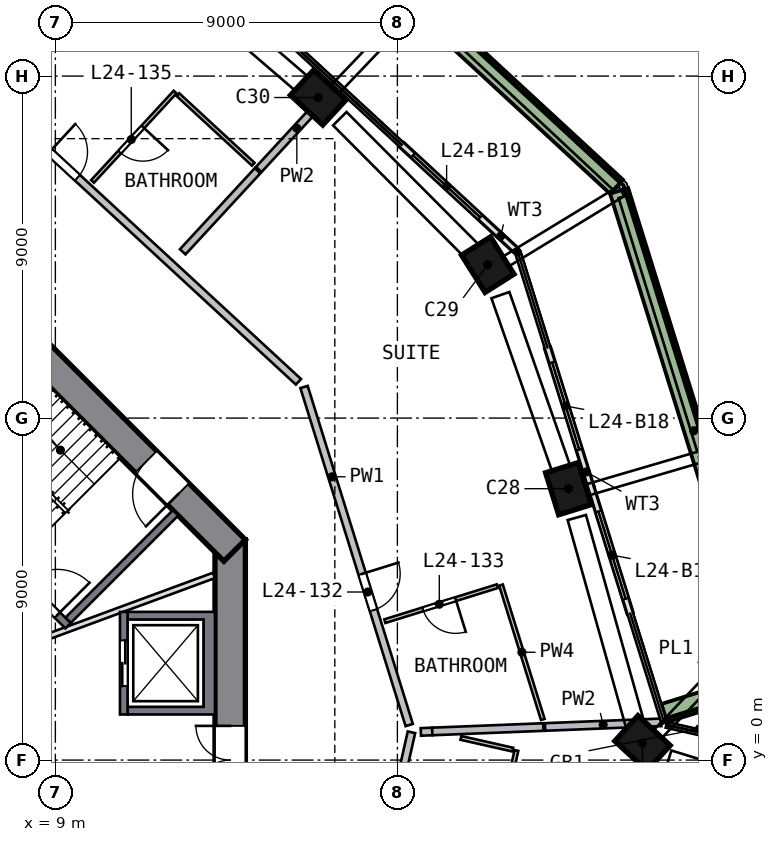
"""IFC4 building model, lengths in metres.
Left out: names, types, materials, properties, quantities, classifications, styles, units other than length and angle.
Written with IfcOpenShell. Run it as: python <this file> out.ifc"""

import sys

from ifc_helpers import new_model, si_unit, direction, frame, frame_2d, origin, origin_2d, place, context, subcontext, project, spatial, polyline, rectangle, outline, extrude, element, fill, save


model = new_model("IFC4")
c1 = context("Model", 3, precision=1e-05, world=origin(), true_north=direction((0.0, 1.0)))
c2 = subcontext(c1, "Body", "Model", "MODEL_VIEW")
j1 = project(units=[si_unit("LENGTHUNIT", "METRE"), si_unit("PLANEANGLEUNIT", "RADIAN")], contexts=[c1])
p1 = place(None, origin())
s1 = spatial("IfcSite", under=j1, at=p1, CompositionType="ELEMENT")
p2 = place(p1, origin())
s2 = spatial("IfcBuilding", under=s1, at=p2, CompositionType="ELEMENT")
p3 = place(p2, frame((0.0, 0.0, 103.5)))
s3 = spatial("IfcBuildingStorey", under=s2, at=p3, CompositionType="ELEMENT", Elevation=103.5)
p4 = place(p3, frame((24.452, 0.303, 0.0), z_axis=(-0.002432499, 0.116227826, 0.993219601), x_axis=(0.736974698, -0.671128585, 0.080341252)))
e1 = element("IfcColumn", 1, at=p4, inside=s3, PredefinedType="COLUMN", context=c2, shape_type="SweptSolid", body=[
    extrude(rectangle(XDim=1.15, YDim=0.9, at=origin_2d()), origin(), (0.0, 0.0, 1.0), 3.212),
])
p5 = place(p3, frame((22.543, 7.013, 0.0), z_axis=(-0.034222789, 0.106927204, 0.993677701), x_axis=(-0.29485661, 0.948923521, -0.112266336)))
e2 = element("IfcColumn", 2, at=p5, inside=s3, PredefinedType="COLUMN", context=c2, shape_type="SweptSolid", body=[
    extrude(rectangle(XDim=1.15, YDim=0.9, at=origin_2d()), origin(), (0.0, 0.0, 1.0), 3.21),
])
p6 = place(p3, frame((20.454, 12.92, 0.0), z_axis=(-0.062265779, 0.096705826, 0.993363456), x_axis=(0.530656246, -0.839747489, 0.115013491)))
e3 = element("IfcColumn", 3, at=p6, inside=s3, PredefinedType="COLUMN", context=c2, shape_type="SweptSolid", body=[
    extrude(rectangle(XDim=1.15, YDim=0.9, at=origin_2d()), origin(), (0.0, 0.0, 1.0), 3.211),
])
p7 = place(p3, frame((16.016, 17.344, 0.0), z_axis=(-0.083123025, 0.075517991, 0.993673787), x_axis=(-0.729776299, 0.674399767, -0.112300969)))
e4 = element("IfcColumn", 4, at=p7, inside=s3, PredefinedType="COLUMN", context=c2, shape_type="SweptSolid", body=[
    extrude(rectangle(XDim=1.15, YDim=0.9, at=origin_2d()), origin(), (0.0, 0.0, 1.0), 3.21),
])
p8 = place(p3, frame((13.6, -5.799, 0.0), z_axis=(0.0, 0.0, 1.0), x_axis=(0.0, 1.0, 0.0)))
e5 = element("IfcWall", 5, at=p8, inside=s3, PredefinedType="SHEAR", context=c2, shape_type="SweptSolid", body=[
    extrude(rectangle(XDim=11.598, YDim=0.8, at=frame_2d((5.799, 0.0))), origin(), (0.0, 0.0, 1.0), 3.5),
])
p9 = place(p8, frame((4.899, 0.0, 0.0)))
e6 = element("IfcOpeningElement", 6, at=p9, cuts=e5, PredefinedType="OPENING", context=c2, shape_type="SweptSolid", body=[
    extrude(rectangle(XDim=1.8, YDim=2.1, at=frame_2d((0.9, 1.05))), frame((0.0, 0.41, 0.0), z_axis=(0.0, -1.0, 0.0), x_axis=(1.0, 0.0, 0.0)), (0.0, 0.0, 1.0), 0.82),
])
p10 = place(p3, frame((13.717, 5.516, 0.0), z_axis=(0.0, 0.0, 1.0), x_axis=(-0.707106781, 0.707106781, 0.0)))
e7 = element("IfcWall", 7, at=p10, inside=s3, PredefinedType="SHEAR", context=c2, shape_type="SweptSolid", body=[
    extrude(rectangle(XDim=11.598, YDim=0.8, at=frame_2d((5.799, 0.0))), origin(), (0.0, 0.0, 1.0), 3.5),
])
p11 = place(p10, frame((2.099, 0.0, 0.0)))
e8 = element("IfcOpeningElement", 8, at=p11, cuts=e7, PredefinedType="OPENING", context=c2, shape_type="SweptSolid", body=[
    extrude(rectangle(XDim=1.2, YDim=2.1, at=frame_2d((0.6, 1.05))), frame((0.0, 0.41, 0.0), z_axis=(0.0, -1.0, 0.0), x_axis=(1.0, 0.0, 0.0)), (0.0, 0.0, 1.0), 0.82),
])
p12 = place(p3, frame((24.124, 3.865, 0.0), z_axis=(0.0, 0.0, 1.0), x_axis=(-0.297046624, 0.954862976, 0.0)))
e9 = element("IfcWall", 9, at=p12, inside=s3, PredefinedType="SOLIDWALL", context=c2, shape_type="SweptSolid", body=[
    extrude(rectangle(XDim=3.475, YDim=0.15, at=frame_2d((1.737, 0.0))), origin(), (0.0, 0.0, 1.0), 2.425),
])
p13 = place(p12, frame((0.4, 0.0, 0.0)))
e10 = element("IfcOpeningElement", 10, at=p13, cuts=e9, PredefinedType="OPENING", context=c2, shape_type="SweptSolid", body=[
    extrude(rectangle(XDim=2.4, YDim=2.4, at=frame_2d((1.2, 1.2))), frame((0.0, 0.085, 0.0), z_axis=(0.0, -1.0, 0.0), x_axis=(1.0, 0.0, 0.0)), (0.0, 0.0, 1.0), 0.17),
])
p14 = place(p3, frame((23.092, 7.183, 0.0), z_axis=(0.0, 0.0, 1.0), x_axis=(-0.297049788, 0.954861992, 0.0)))
e11 = element("IfcWall", 11, at=p14, inside=s3, PredefinedType="SOLIDWALL", context=c2, shape_type="SweptSolid", body=[
    extrude(rectangle(XDim=3.836, YDim=0.15, at=frame_2d((1.918, 0.0))), origin(), (0.0, 0.0, 1.0), 2.425),
])
p15 = place(p14, frame((1.035, 0.0, 0.0)))
e12 = element("IfcOpeningElement", 12, at=p15, cuts=e11, PredefinedType="OPENING", context=c2, shape_type="SweptSolid", body=[
    extrude(rectangle(XDim=2.4, YDim=2.4, at=frame_2d((1.2, 1.2))), frame((0.0, 0.085, 0.0), z_axis=(0.0, -1.0, 0.0), x_axis=(1.0, 0.0, 0.0)), (0.0, 0.0, 1.0), 0.17),
])
p16 = place(p3, frame((21.108, 13.425, 0.0), z_axis=(0.0, 0.0, 1.0), x_axis=(-0.734695286, 0.678397256, 0.0)))
e13 = element("IfcWall", 13, at=p16, inside=s3, PredefinedType="SOLIDWALL", context=c2, shape_type="SweptSolid", body=[
    extrude(rectangle(XDim=4.068, YDim=0.15, at=frame_2d((2.034, 0.0))), origin(), (0.0, 0.0, 1.0), 2.425),
])
p17 = place(p16, frame((1.268, 0.0, 0.0)))
e14 = element("IfcOpeningElement", 14, at=p17, cuts=e13, PredefinedType="OPENING", context=c2, shape_type="SweptSolid", body=[
    extrude(rectangle(XDim=2.4, YDim=2.4, at=frame_2d((1.2, 1.2))), frame((0.0, 0.085, 0.0), z_axis=(0.0, -1.0, 0.0), x_axis=(1.0, 0.0, 0.0)), (0.0, 0.0, 1.0), 0.17),
])
p18 = place(p3, frame((25.021, 1.238, 0.0), z_axis=(0.0, 0.0, 1.0), x_axis=(0.954841862, 0.297114489, 0.0)))
e15 = element("IfcWall", 15, at=p18, inside=s3, PredefinedType="SOLIDWALL", context=c2, shape_type="SweptSolid", body=[
    extrude(rectangle(XDim=3.199, YDim=0.5, at=frame_2d((1.6, 0.0))), origin(), (0.0, 0.0, 1.0), 0.7),
])
p19 = place(p3, frame((27.762, 2.353, 0.0), z_axis=(0.0, 0.0, 1.0), x_axis=(-0.297026901, 0.954869112, 0.0)))
e16 = element("IfcWall", 16, at=p19, inside=s3, PredefinedType="SOLIDWALL", context=c2, shape_type="SweptSolid", body=[
    extrude(rectangle(XDim=13.223, YDim=0.5, at=frame_2d((6.612, 0.0))), origin(), (0.0, 0.0, 1.0), 0.7),
])
p20 = place(p3, frame((23.765, 15.089, 0.0), z_axis=(0.0, 0.0, 1.0), x_axis=(-0.734673161, 0.678421217, 0.0)))
e17 = element("IfcWall", 17, at=p20, inside=s3, PredefinedType="SOLIDWALL", context=c2, shape_type="SweptSolid", body=[
    extrude(rectangle(XDim=13.723, YDim=0.5, at=frame_2d((6.862, 0.0))), origin(), (0.0, 0.0, 1.0), 0.7),
])
p21 = place(p3, frame((26.858, 0.447, 0.0), z_axis=(0.0, 0.0, 1.0), x_axis=(-0.220190066, -0.975456988, 0.0)))
e18 = element("IfcWall", 18, at=p21, inside=s3, PredefinedType="SOLIDWALL", context=c2, shape_type="SweptSolid", body=[
    extrude(rectangle(XDim=12.7, YDim=0.2, at=frame_2d((6.35, 0.0))), origin(), (0.0, 0.0, 1.0), 3.19),
])
p22 = place(p21, frame((5.45, 0.0, 0.0)))
e19 = element("IfcOpeningElement", 19, at=p22, cuts=e18, PredefinedType="OPENING", context=c2, shape_type="SweptSolid", body=[
    extrude(rectangle(XDim=1.8, YDim=2.4, at=frame_2d((0.9, 1.2))), frame((0.0, 0.11, 0.0), z_axis=(0.0, -1.0, 0.0), x_axis=(1.0, 0.0, 0.0)), (0.0, 0.0, 1.0), 0.22),
])
p23 = place(p3, origin())
e20 = element("IfcWall", 20, at=p23, inside=s3, PredefinedType="SOLIDWALL", context=c2, shape_type="SweptSolid", body=[
    extrude(outline(polyline([(13.2, 3.9), (13.2, 1.2), (10.9, 1.2), (10.9, 1.4), (12.9, 1.4), (12.9, 3.7), (10.9, 3.7), (10.9, 3.9), (13.2, 3.9)])), origin(), (0.0, 0.0, 1.0), 3.19),
])
p24 = place(p3, frame((10.8, 1.2, 0.0), z_axis=(0.0, 0.0, 1.0), x_axis=(0.0, 1.0, 0.0)))
e21 = element("IfcWall", 21, at=p24, inside=s3, PredefinedType="SOLIDWALL", context=c2, shape_type="SweptSolid", body=[
    extrude(rectangle(XDim=2.7, YDim=0.2, at=frame_2d((1.35, 0.0))), origin(), (0.0, 0.0, 1.0), 3.19),
])
p25 = place(p24, frame((0.75, 0.0, 0.0)))
e22 = element("IfcOpeningElement", 22, at=p25, cuts=e21, PredefinedType="OPENING", context=c2, shape_type="SweptSolid", body=[
    extrude(rectangle(XDim=1.2, YDim=2.1, at=frame_2d((0.6, 1.05))), frame((0.0, 0.11, 0.0), z_axis=(0.0, -1.0, 0.0), x_axis=(1.0, 0.0, 0.0)), (0.0, 0.0, 1.0), 0.22),
])
p26 = place(p3, frame((3.535, 9.334, 0.0), z_axis=(0.0, 0.0, 1.0), x_axis=(0.707106781, -0.707106781, 0.0)))
e23 = element("IfcWall", 23, at=p26, inside=s3, PredefinedType="SOLIDWALL", context=c2, shape_type="SweptSolid", body=[
    extrude(rectangle(XDim=8.2, YDim=0.2, at=frame_2d((4.1, 0.0))), origin(), (0.0, 0.0, 1.0), 3.19),
])
p27 = place(p26, frame((6.6, 0.0, 0.0)))
e24 = element("IfcOpeningElement", 24, at=p27, cuts=e23, PredefinedType="OPENING", context=c2, shape_type="SweptSolid", body=[
    extrude(rectangle(XDim=1.2, YDim=2.1, at=frame_2d((0.6, 1.05))), frame((0.0, 0.11, 0.0), z_axis=(0.0, -1.0, 0.0), x_axis=(1.0, 0.0, 0.0)), (0.0, 0.0, 1.0), 0.22),
])
p28 = place(p3, frame((9.334, 3.677, 0.0), z_axis=(0.0, 0.0, 1.0), x_axis=(0.707106781, 0.707106781, 0.0)))
e25 = element("IfcWall", 25, at=p28, inside=s3, PredefinedType="SOLIDWALL", context=c2, shape_type="SweptSolid", body=[
    extrude(rectangle(XDim=4.0, YDim=0.2, at=frame_2d((2.0, 0.0))), origin(), (0.0, 0.0, 1.0), 3.19),
])
p29 = place(p3, frame((4.813, 1.776, 0.0), z_axis=(0.0, 0.0, 1.0), x_axis=(0.938191915, 0.346115488, 0.0)))
e26 = element("IfcWall", 26, at=p29, inside=s3, PredefinedType="PARTITIONING", context=c2, shape_type="SweptSolid", body=[
    extrude(rectangle(XDim=8.91, YDim=0.15, at=frame_2d((4.455, 0.0))), origin(), (0.0, 0.0, 1.0), 3.19),
])
p30 = place(p29, frame((1.4, 0.0, 0.0)))
e27 = element("IfcOpeningElement", 27, at=p30, cuts=e26, PredefinedType="OPENING", context=c2, shape_type="SweptSolid", body=[
    extrude(rectangle(XDim=1.8, YDim=2.1, at=frame_2d((0.9, 1.05))), frame((0.0, 0.085, 0.0), z_axis=(0.0, -1.0, 0.0), x_axis=(1.0, 0.0, 0.0)), (0.0, 0.0, 1.0), 0.17),
])
p31 = place(p3, frame((8.699, 16.139, 0.0), z_axis=(0.0, 0.0, 1.0), x_axis=(0.734682268, -0.678411354, 0.0)))
e28 = element("IfcWall", 28, at=p31, inside=s3, PredefinedType="SOLIDWALL", context=c2, shape_type="SweptSolid", body=[
    extrude(rectangle(XDim=9.115, YDim=0.2, at=frame_2d((4.558, 0.0))), origin(), (0.0, 0.0, 1.0), 3.19),
])
p32 = place(p31, frame((0.2, 0.0, 0.0)))
e29 = element("IfcOpeningElement", 29, at=p32, cuts=e28, PredefinedType="OPENING", context=c2, shape_type="SweptSolid", body=[
    extrude(rectangle(XDim=1.0, YDim=2.1, at=frame_2d((0.5, 1.05))), frame((0.0, 0.11, 0.0), z_axis=(0.0, -1.0, 0.0), x_axis=(1.0, 0.0, 0.0)), (0.0, 0.0, 1.0), 0.22),
])
p33 = place(p3, frame((15.543, 9.818, 0.0), z_axis=(0.0, 0.0, 1.0), x_axis=(0.297043721, -0.954863879, 0.0)))
e30 = element("IfcWall", 30, at=p33, inside=s3, PredefinedType="SOLIDWALL", context=c2, shape_type="SweptSolid", body=[
    extrude(rectangle(XDim=9.316, YDim=0.2, at=frame_2d((4.658, 0.0))), origin(), (0.0, 0.0, 1.0), 3.19),
])
p34 = place(p33, frame((5.15, 0.0, 0.0)))
e31 = element("IfcOpeningElement", 31, at=p34, cuts=e30, PredefinedType="OPENING", context=c2, shape_type="SweptSolid", body=[
    extrude(rectangle(XDim=1.0, YDim=2.1, at=frame_2d((0.5, 1.05))), frame((0.0, 0.11, 0.0), z_axis=(0.0, -1.0, 0.0), x_axis=(1.0, 0.0, 0.0)), (0.0, 0.0, 1.0), 0.22),
])
p35 = place(p3, frame((17.565, -2.837, 0.0), z_axis=(0.0, 0.0, 1.0), x_axis=(0.220158455, 0.975464123, 0.0)))
e32 = element("IfcWall", 32, at=p35, inside=s3, PredefinedType="SOLIDWALL", context=c2, shape_type="SweptSolid", body=[
    extrude(rectangle(XDim=3.658, YDim=0.2, at=frame_2d((1.829, 0.0))), origin(), (0.0, 0.0, 1.0), 3.19),
])
p36 = place(p3, frame((12.351, 13.375, 0.0), z_axis=(0.0, 0.0, 1.0), x_axis=(0.678388316, 0.73470354, 0.0)))
e33 = element("IfcWall", 33, at=p36, inside=s3, PredefinedType="SOLIDWALL", context=c2, shape_type="SweptSolid", body=[
    extrude(rectangle(XDim=2.905, YDim=0.2, at=frame_2d((1.452, 0.0))), origin(), (0.0, 0.0, 1.0), 3.19),
])
p37 = place(p3, frame((14.353, 15.543, 0.0), z_axis=(0.0, 0.0, 1.0), x_axis=(0.678427795, 0.734667086, 0.0)))
e34 = element("IfcWall", 34, at=p37, inside=s3, PredefinedType="SOLIDWALL", context=c2, shape_type="SweptSolid", body=[
    extrude(rectangle(XDim=2.952, YDim=0.2, at=frame_2d((1.476, 0.0))), origin(), (0.0, 0.0, 1.0), 3.19),
])
p38 = place(p3, frame((18.616, 0.741, 0.0), z_axis=(0.0, 0.0, 1.0), x_axis=(0.999211282, 0.039709126, 0.0)))
e35 = element("IfcWall", 35, at=p38, inside=s3, PredefinedType="SOLIDWALL", context=c2, shape_type="SweptSolid", body=[
    extrude(rectangle(XDim=0.301, YDim=0.2, at=frame_2d((0.151, 0.0))), origin(), (0.0, 0.0, 1.0), 3.19),
])
p39 = place(p3, frame((18.917, 0.753, 0.0), z_axis=(0.0, 0.0, 1.0), x_axis=(0.999210134, 0.039737992, 0.0)))
e36 = element("IfcWall", 36, at=p39, inside=s3, PredefinedType="SOLIDWALL", context=c2, shape_type="SweptSolid", body=[
    extrude(rectangle(XDim=2.924, YDim=0.2, at=frame_2d((1.462, 0.0))), origin(), (0.0, 0.0, 1.0), 3.19),
])
p40 = place(p3, frame((21.885, 0.871, 0.0), z_axis=(0.0, 0.0, 1.0), x_axis=(0.99920795, 0.039792878, 0.0)))
e37 = element("IfcWall", 37, at=p40, inside=s3, PredefinedType="SOLIDWALL", context=c2, shape_type="SweptSolid", body=[
    extrude(rectangle(XDim=3.062, YDim=0.2, at=frame_2d((1.531, 0.0))), origin(), (0.0, 0.0, 1.0), 3.19),
])
p41 = place(p3, frame((12.15, 17.58, 0.0), z_axis=(0.0, 0.0, 1.0), x_axis=(-0.678394168, -0.734698137, 0.0)))
e38 = element("IfcWall", 38, at=p41, inside=s3, PredefinedType="PARTITIONING", context=c2, shape_type="SweptSolid", body=[
    extrude(rectangle(XDim=3.2, YDim=0.1, at=frame_2d((1.6, 0.0))), origin(), (0.0, 0.0, 1.0), 3.19),
])
p42 = place(p41, frame((1.25, 0.0, 0.0)))
e39 = element("IfcOpeningElement", 39, at=p42, cuts=e38, PredefinedType="OPENING", context=c2, shape_type="SweptSolid", body=[
    extrude(rectangle(XDim=0.9, YDim=2.1, at=frame_2d((0.45, 1.05))), frame((0.0, 0.06, 0.0), z_axis=(0.0, -1.0, 0.0), x_axis=(1.0, 0.0, 0.0)), (0.0, 0.0, 1.0), 0.12),
])
p43 = place(p3, frame((12.224, 17.512, 0.0), z_axis=(0.0, 0.0, 1.0), x_axis=(0.734668232, -0.678426553, 0.0)))
e40 = element("IfcWall", 40, at=p43, inside=s3, PredefinedType="PARTITIONING", context=c2, shape_type="SweptSolid", body=[
    extrude(rectangle(XDim=2.7, YDim=0.1, at=frame_2d((1.35, 0.0))), origin(), (0.0, 0.0, 1.0), 3.19),
])
p44 = place(p3, frame((20.63, 4.576, 0.0), z_axis=(0.0, 0.0, 1.0), x_axis=(-0.954877129, -0.297001126, 0.0)))
e41 = element("IfcWall", 41, at=p44, inside=s3, PredefinedType="PARTITIONING", context=c2, shape_type="SweptSolid", body=[
    extrude(rectangle(XDim=3.1, YDim=0.1, at=frame_2d((1.55, 0.0))), origin(), (0.0, 0.0, 1.0), 3.19),
])
p45 = place(p44, frame((1.15, 0.0, 0.0)))
e42 = element("IfcOpeningElement", 42, at=p45, cuts=e41, PredefinedType="OPENING", context=c2, shape_type="SweptSolid", body=[
    extrude(rectangle(XDim=0.9, YDim=2.1, at=frame_2d((0.45, 1.05))), frame((0.0, 0.06, 0.0), z_axis=(0.0, -1.0, 0.0), x_axis=(1.0, 0.0, 0.0)), (0.0, 0.0, 1.0), 0.12),
])
p46 = place(p3, frame((19.671, 0.583, 0.0), z_axis=(0.0, 0.0, 1.0), x_axis=(0.975471239, -0.220126921, 0.0)))
e43 = element("IfcWall", 43, at=p46, inside=s3, PredefinedType="PARTITIONING", context=c2, shape_type="SweptSolid", body=[
    extrude(rectangle(XDim=1.399, YDim=0.1, at=frame_2d((0.699, 0.0))), origin(), (0.0, 0.0, 1.0), 3.19),
])
p47 = place(p3, frame((20.34, -3.259, 0.0), z_axis=(0.0, 0.0, 1.0), x_axis=(0.220196346, 0.97545557, 0.0)))
e44 = element("IfcWall", 44, at=p47, inside=s3, PredefinedType="PARTITIONING", context=c2, shape_type="SweptSolid", body=[
    extrude(rectangle(XDim=3.6, YDim=0.1, at=frame_2d((1.8, 0.0))), origin(), (0.0, 0.0, 1.0), 3.19),
])
p48 = place(p47, frame((1.2, 0.0, 0.0)))
e45 = element("IfcOpeningElement", 45, at=p48, cuts=e44, PredefinedType="OPENING", context=c2, shape_type="SweptSolid", body=[
    extrude(rectangle(XDim=1.0, YDim=2.1, at=frame_2d((0.5, 1.05))), frame((0.0, 0.06, 0.0), z_axis=(0.0, -1.0, 0.0), x_axis=(1.0, 0.0, 0.0)), (0.0, 0.0, 1.0), 0.12),
])
p49 = place(p3, frame((20.726, 4.606, 0.0), z_axis=(0.0, 0.0, 1.0), x_axis=(0.297062546, -0.954858023, 0.0)))
e46 = element("IfcWall", 46, at=p49, inside=s3, PredefinedType="PARTITIONING", context=c2, shape_type="SweptSolid", body=[
    extrude(rectangle(XDim=3.704, YDim=0.1, at=frame_2d((1.852, 0.0))), origin(), (0.0, 0.0, 1.0), 3.19),
])
p50 = place(p13, origin())
e47 = element("IfcDoor", 47, at=p50, inside=s3, OperationType="SLIDING_TO_RIGHT", PredefinedType="DOOR", context=c2, shape_type="SweptSolid", body=[
    extrude(rectangle(XDim=2.4, YDim=2.4, at=frame_2d((1.2, 1.2))), frame((0.0, 0.025, 0.0), z_axis=(0.0, -1.0, 0.0), x_axis=(1.0, 0.0, 0.0)), (0.0, 0.0, 1.0), 0.05),
])
fill(e10, e47)
p51 = place(p15, origin())
e48 = element("IfcDoor", 48, at=p51, inside=s3, OperationType="SLIDING_TO_LEFT", PredefinedType="DOOR", context=c2, shape_type="SweptSolid", body=[
    extrude(rectangle(XDim=2.4, YDim=2.4, at=frame_2d((1.2, 1.2))), frame((0.0, 0.025, 0.0), z_axis=(0.0, -1.0, 0.0), x_axis=(1.0, 0.0, 0.0)), (0.0, 0.0, 1.0), 0.05),
])
fill(e12, e48)
p52 = place(p17, origin())
e49 = element("IfcDoor", 49, at=p52, inside=s3, OperationType="SLIDING_TO_LEFT", PredefinedType="DOOR", context=c2, shape_type="SweptSolid", body=[
    extrude(rectangle(XDim=2.4, YDim=2.4, at=frame_2d((1.2, 1.2))), frame((0.0, 0.025, 0.0), z_axis=(0.0, -1.0, 0.0), x_axis=(1.0, 0.0, 0.0)), (0.0, 0.0, 1.0), 0.05),
])
fill(e14, e49)
p53 = place(p25, origin())
e50 = element("IfcDoor", 50, at=p53, inside=s3, OperationType="DOUBLE_DOOR_SLIDING", PredefinedType="DOOR", context=c2, shape_type="SweptSolid", body=[
    extrude(rectangle(XDim=1.2, YDim=2.1, at=frame_2d((0.6, 1.05))), frame((0.0, 0.025, 0.0), z_axis=(0.0, -1.0, 0.0), x_axis=(1.0, 0.0, 0.0)), (0.0, 0.0, 1.0), 0.05),
])
fill(e22, e50)
p54 = place(p27, origin())
e51 = element("IfcDoor", 51, at=p54, inside=s3, OperationType="SINGLE_SWING_RIGHT", PredefinedType="DOOR", context=c2, shape_type="SweptSolid", body=[
    extrude(rectangle(XDim=1.2, YDim=2.1, at=frame_2d((0.6, 1.05))), frame((0.0, 0.025, 0.0), z_axis=(0.0, -1.0, 0.0), x_axis=(1.0, 0.0, 0.0)), (0.0, 0.0, 1.0), 0.05),
])
fill(e24, e51)
p55 = place(p9, origin())
e52 = element("IfcDoor", 52, at=p55, inside=s3, OperationType="DOUBLE_DOOR_SINGLE_SWING", PredefinedType="DOOR", context=c2, shape_type="SweptSolid", body=[
    extrude(rectangle(XDim=1.8, YDim=2.1, at=frame_2d((0.9, 1.05))), frame((0.0, 0.025, 0.0), z_axis=(0.0, -1.0, 0.0), x_axis=(1.0, 0.0, 0.0)), (0.0, 0.0, 1.0), 0.05),
])
fill(e6, e52)
p56 = place(p11, origin())
e53 = element("IfcDoor", 53, at=p56, inside=s3, OperationType="SINGLE_SWING_LEFT", PredefinedType="DOOR", context=c2, shape_type="SweptSolid", body=[
    extrude(rectangle(XDim=1.2, YDim=2.1, at=frame_2d((0.6, 1.05))), frame((0.0, 0.025, 0.0), z_axis=(0.0, -1.0, 0.0), x_axis=(1.0, 0.0, 0.0)), (0.0, 0.0, 1.0), 0.05),
])
fill(e8, e53)
p57 = place(p34, origin())
e54 = element("IfcDoor", 54, at=p57, inside=s3, OperationType="SINGLE_SWING_LEFT", PredefinedType="DOOR", context=c2, shape_type="SweptSolid", body=[
    extrude(rectangle(XDim=1.0, YDim=2.1, at=frame_2d((0.5, 1.05))), frame((0.0, 0.025, 0.0), z_axis=(0.0, -1.0, 0.0), x_axis=(1.0, 0.0, 0.0)), (0.0, 0.0, 1.0), 0.05),
])
fill(e31, e54)
p58 = place(p45, origin())
e55 = element("IfcDoor", 55, at=p58, inside=s3, OperationType="SINGLE_SWING_LEFT", PredefinedType="DOOR", context=c2, shape_type="SweptSolid", body=[
    extrude(rectangle(XDim=0.9, YDim=2.1, at=frame_2d((0.45, 1.05))), frame((0.0, 0.025, 0.0), z_axis=(0.0, -1.0, 0.0), x_axis=(1.0, 0.0, 0.0)), (0.0, 0.0, 1.0), 0.05),
])
fill(e42, e55)
p59 = place(p32, origin())
e56 = element("IfcDoor", 56, at=p59, inside=s3, OperationType="SINGLE_SWING_LEFT", PredefinedType="DOOR", context=c2, shape_type="SweptSolid", body=[
    extrude(rectangle(XDim=1.0, YDim=2.1, at=frame_2d((0.5, 1.05))), frame((0.0, 0.025, 0.0), z_axis=(0.0, -1.0, 0.0), x_axis=(1.0, 0.0, 0.0)), (0.0, 0.0, 1.0), 0.05),
])
fill(e29, e56)
p60 = place(p42, origin())
e57 = element("IfcDoor", 57, at=p60, inside=s3, OperationType="SINGLE_SWING_LEFT", PredefinedType="DOOR", context=c2, shape_type="SweptSolid", body=[
    extrude(rectangle(XDim=0.9, YDim=2.1, at=frame_2d((0.45, 1.05))), frame((0.0, 0.025, 0.0), z_axis=(0.0, -1.0, 0.0), x_axis=(1.0, 0.0, 0.0)), (0.0, 0.0, 1.0), 0.05),
])
fill(e39, e57)
save(model, sys.argv[1])
